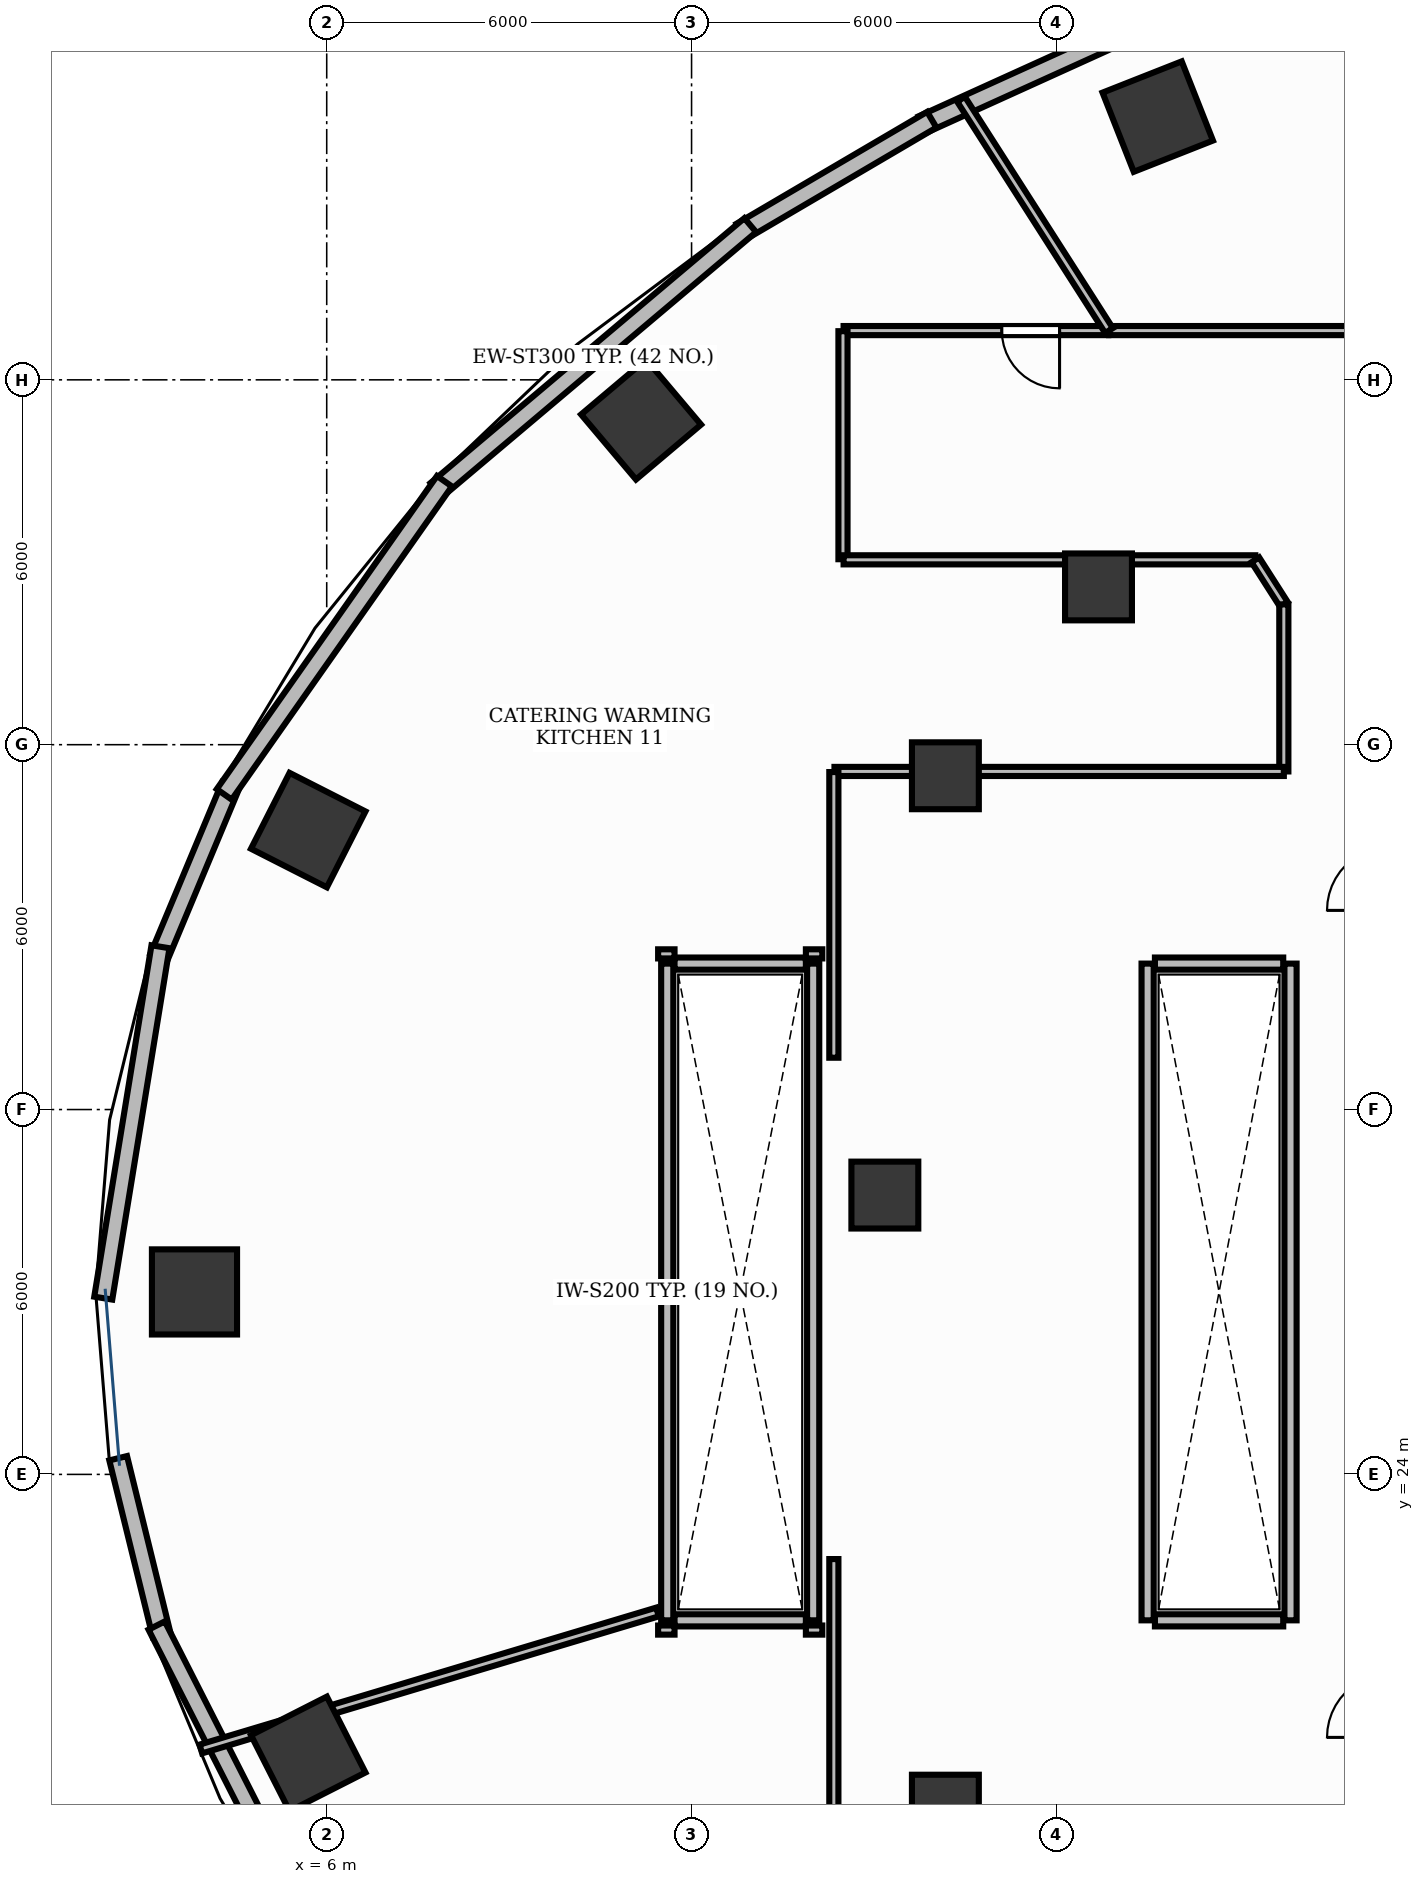
"""IFC4 building model, lengths in metres.
Left out: names, types, materials, properties, quantities, classifications, styles, units other than length and angle.
Written with IfcOpenShell. Run it as: python <this file> out.ifc"""

import sys

from ifc_helpers import new_model, si_unit, direction, frame, frame_2d, origin, origin_2d, place, context, subcontext, project, spatial, rectangle, extrude, element, fill, save


model = new_model("IFC4")
c1 = context("Model", 3, precision=1e-05, world=origin(), true_north=direction((0.0, 1.0)))
c2 = subcontext(c1, "Body", "Model", "MODEL_VIEW")
j1 = project(units=[si_unit("LENGTHUNIT", "METRE"), si_unit("PLANEANGLEUNIT", "RADIAN")], contexts=[c1])
p1 = place(None, origin())
s1 = spatial("IfcSite", under=j1, at=p1, CompositionType="ELEMENT")
p2 = place(p1, origin())
s2 = spatial("IfcBuilding", under=s1, at=p2, CompositionType="ELEMENT")
p3 = place(p2, frame((0.0, 0.0, 20.4)))
s3 = spatial("IfcBuildingStorey", under=s2, at=p3, CompositionType="ELEMENT", Elevation=20.4)
for number, where, z_axis, x_axis in (
    (1, (19.667, 46.329, -0.0), (0.0, 0.0, 1.0), (0.93, 0.367, 0.0)),
    (2, (11.17, 41.347, -0.0), (0.0, 0.0, 1.0), (0.764, 0.645, 0.0)),
):
    element("IfcColumn", number, at=place(p3, frame(where, z_axis=z_axis, x_axis=x_axis)), inside=s3, PredefinedType="COLUMN", context=c2, shape_type="SweptSolid", body=[
        extrude(rectangle(XDim=1.4, YDim=1.4, at=origin_2d()), origin(), (0.0, 0.0, 1.0), 5.101),
    ])
p4 = place(p3, frame((18.692, 38.595, -0.0), z_axis=(0.0, 0.0, 1.0), x_axis=(1.0, 0.0, 0.0)))
e3 = element("IfcColumn", 3, at=p4, inside=s3, PredefinedType="COLUMN", context=c2, shape_type="SweptSolid", body=[
    extrude(rectangle(XDim=1.1, YDim=1.1, at=origin_2d()), origin(), (0.0, 0.0, 1.0), 5.101),
])
p5 = place(p3, frame((5.696, 34.596, -0.0), z_axis=(0.0, 0.0, 1.0), x_axis=(0.453057191132, 0.891481453292, 0.0)))
e4 = element("IfcColumn", 4, at=p5, inside=s3, PredefinedType="COLUMN", context=c2, shape_type="SweptSolid", body=[
    extrude(rectangle(XDim=1.4, YDim=1.4, at=origin_2d()), origin(), (0.0, 0.0, 1.0), 5.101),
])
p6 = place(p3, frame((16.174, 35.489, -0.0), z_axis=(0.0, 0.0, 1.0), x_axis=(1.0, 0.0, 0.0)))
e5 = element("IfcColumn", 5, at=p6, inside=s3, PredefinedType="COLUMN", context=c2, shape_type="SweptSolid", body=[
    extrude(rectangle(XDim=1.1, YDim=1.1, at=origin_2d()), origin(), (0.0, 0.0, 1.0), 5.101),
])
p7 = place(p3, frame((3.825, 27.001, -0.0), z_axis=(0.0, 0.0, 1.0), x_axis=(0.0, 1.0, 0.0)))
e6 = element("IfcColumn", 6, at=p7, inside=s3, PredefinedType="COLUMN", context=c2, shape_type="SweptSolid", body=[
    extrude(rectangle(XDim=1.4, YDim=1.4, at=origin_2d()), origin(), (0.0, 0.0, 1.0), 5.101),
])
p8 = place(p3, frame((15.179, 28.594, -0.0), z_axis=(0.0, 0.0, 1.0), x_axis=(1.0, 0.0, 0.0)))
e7 = element("IfcColumn", 7, at=p8, inside=s3, PredefinedType="COLUMN", context=c2, shape_type="SweptSolid", body=[
    extrude(rectangle(XDim=1.1, YDim=1.1, at=origin_2d()), origin(), (0.0, 0.0, 1.0), 5.101),
])
p9 = place(p3, frame((5.696, 19.404, -0.0), z_axis=(0.0, 0.0, 1.0), x_axis=(-0.453057191132, 0.891481453292, 0.0)))
e8 = element("IfcColumn", 8, at=p9, inside=s3, PredefinedType="COLUMN", context=c2, shape_type="SweptSolid", body=[
    extrude(rectangle(XDim=1.4, YDim=1.4, at=origin_2d()), origin(), (0.0, 0.0, 1.0), 5.101),
])
p10 = place(p3, frame((16.174, 18.511, -0.0), z_axis=(0.0, 0.0, 1.0), x_axis=(1.0, 0.0, 0.0)))
e9 = element("IfcColumn", 9, at=p10, inside=s3, PredefinedType="COLUMN", context=c2, shape_type="SweptSolid", body=[
    extrude(rectangle(XDim=1.1, YDim=1.1, at=origin_2d()), origin(), (0.0, 0.0, 1.0), 5.101),
])
p11 = place(p3, frame((4.417, 35.323, 0.0), z_axis=(0.0, 0.0, 1.0), x_axis=(-0.385358473275, -0.92276695166, 0.0)))
e10 = element("IfcWall", 10, at=p11, inside=s3, PredefinedType="STANDARD", context=c2, shape_type="SweptSolid", body=[
    extrude(rectangle(XDim=3.056, YDim=0.3, at=frame_2d((1.528, 0.0))), origin(), (0.0, 0.0, 1.0), 4.67),
])
p12 = place(p3, frame((2.571, 24.266, 0.0), z_axis=(0.0, 0.0, 1.0), x_axis=(0.238522035896, -0.971137085273, 0.0)))
e11 = element("IfcWall", 11, at=p12, inside=s3, PredefinedType="STANDARD", context=c2, shape_type="SweptSolid", body=[
    extrude(rectangle(XDim=2.993, YDim=0.3, at=frame_2d((1.497, 0.0))), origin(), (0.0, 0.0, 1.0), 5.1),
])
p13 = place(p3, frame((19.201, 47.743, 0.0), z_axis=(0.0, 0.0, 1.0), x_axis=(-0.910623406862, -0.413237233166, 0.0)))
e12 = element("IfcWall", 12, at=p13, inside=s3, PredefinedType="STANDARD", context=c2, shape_type="SweptSolid", body=[
    extrude(rectangle(XDim=3.74, YDim=0.3, at=frame_2d((1.87, 0.0))), origin(), (0.0, 0.0, 1.0), 5.1),
])
p14 = place(p3, frame((15.951, 46.278, 0.0), z_axis=(0.0, 0.0, 1.0), x_axis=(-0.8624654944, -0.506115867139, 0.0)))
e13 = element("IfcWall", 13, at=p14, inside=s3, PredefinedType="STANDARD", context=c2, shape_type="SweptSolid", body=[
    extrude(rectangle(XDim=3.635, YDim=0.3, at=frame_2d((1.818, 0.0))), origin(), (0.0, 0.0, 1.0), 5.1),
])
p15 = place(p3, frame((12.965, 44.544, 0.0), z_axis=(0.0, 0.0, 1.0), x_axis=(-0.764279788114, -0.644884800162, 0.0)))
e14 = element("IfcWall", 14, at=p15, inside=s3, PredefinedType="STANDARD", context=c2, shape_type="SweptSolid", body=[
    extrude(rectangle(XDim=6.752, YDim=0.3, at=frame_2d((3.376, 0.0))), origin(), (0.0, 0.0, 1.0), 5.1),
])
p16 = place(p3, frame((7.936, 40.333, 0.0), z_axis=(0.0, 0.0, 1.0), x_axis=(-0.575165804445, -0.818036855769, 0.0)))
e15 = element("IfcWall", 15, at=p16, inside=s3, PredefinedType="STANDARD", context=c2, shape_type="SweptSolid", body=[
    extrude(rectangle(XDim=6.296, YDim=0.3, at=frame_2d((3.148, 0.0))), origin(), (0.0, 0.0, 1.0), 5.1),
])
p17 = place(p3, frame((3.266, 32.677, 0.0), z_axis=(0.0, 0.0, 1.0), x_axis=(-0.160712446639, -0.987001271273, 0.0)))
e16 = element("IfcWall", 16, at=p17, inside=s3, PredefinedType="STANDARD", context=c2, shape_type="SweptSolid", body=[
    extrude(rectangle(XDim=5.855, YDim=0.3, at=frame_2d((2.927, 0.0))), origin(), (0.0, 0.0, 1.0), 4.67),
])
p18 = place(p3, frame((3.204, 21.514, 0.0), z_axis=(0.0, 0.0, 1.0), x_axis=(0.453093111502, -0.891463197395, 0.0)))
e17 = element("IfcWall", 17, at=p18, inside=s3, PredefinedType="STANDARD", context=c2, shape_type="SweptSolid", body=[
    extrude(rectangle(XDim=6.102, YDim=0.3, at=frame_2d((3.051, 0.0))), origin(), (0.0, 0.0, 1.0), 5.1),
])
for number, where, z_axis, x_axis in (
    (18, (11.6, 21.6, 0.0), (0.0, 0.0, 1.0), (0.0, 1.0, 0.0)),
    (19, (14.0, 21.6, 0.0), (0.0, 0.0, 1.0), (0.0, 1.0, 0.0)),
):
    element("IfcWall", number, at=place(p3, frame(where, z_axis=z_axis, x_axis=x_axis)), inside=s3, PredefinedType="PARTITIONING", context=c2, shape_type="SweptSolid", body=[
        extrude(rectangle(XDim=10.8, YDim=0.2, at=frame_2d((5.4, 0.0))), origin(), (0.0, 0.0, 1.0), 4.11),
    ])
for number, where, z_axis, x_axis in (
    (20, (11.72, 21.6, 0.0), (0.0, 0.0, 1.0), (1.0, 0.0, 0.0)),
    (21, (11.72, 32.4, 0.0), (0.0, 0.0, 1.0), (1.0, 0.0, 0.0)),
):
    element("IfcWall", number, at=place(p3, frame(where, z_axis=z_axis, x_axis=x_axis)), inside=s3, PredefinedType="PARTITIONING", context=c2, shape_type="SweptSolid", body=[
        extrude(rectangle(XDim=2.16, YDim=0.2, at=frame_2d((1.08, 0.0))), origin(), (0.0, 0.0, 1.0), 4.11),
    ])
for number, where, z_axis, x_axis in (
    (22, (19.5, 21.6, 0.0), (0.0, 0.0, 1.0), (0.0, 1.0, 0.0)),
    (23, (21.85, 21.6, 0.0), (0.0, 0.0, 1.0), (0.0, 1.0, 0.0)),
):
    element("IfcWall", number, at=place(p3, frame(where, z_axis=z_axis, x_axis=x_axis)), inside=s3, PredefinedType="PARTITIONING", context=c2, shape_type="SweptSolid", body=[
        extrude(rectangle(XDim=10.8, YDim=0.2, at=frame_2d((5.4, 0.0))), origin(), (0.0, 0.0, 1.0), 4.11),
    ])
for number, where, z_axis, x_axis in (
    (24, (19.62, 21.6, 0.0), (0.0, 0.0, 1.0), (1.0, 0.0, 0.0)),
    (25, (19.62, 32.4, 0.0), (0.0, 0.0, 1.0), (1.0, 0.0, 0.0)),
):
    element("IfcWall", number, at=place(p3, frame(where, z_axis=z_axis, x_axis=x_axis)), inside=s3, PredefinedType="PARTITIONING", context=c2, shape_type="SweptSolid", body=[
        extrude(rectangle(XDim=2.11, YDim=0.2, at=frame_2d((1.055, 0.0))), origin(), (0.0, 0.0, 1.0), 4.11),
    ])
p19 = place(p3, frame((27.583, 42.81, 0.0), z_axis=(0.0, 0.0, 1.0), x_axis=(-1.0, 0.0, 0.0)))
e26 = element("IfcWall", 26, at=p19, inside=s3, PredefinedType="PARTITIONING", context=c2, shape_type="SweptSolid", body=[
    extrude(rectangle(XDim=8.718, YDim=0.15, at=frame_2d((4.359, 0.0))), origin(), (0.0, 0.0, 1.0), 4.11),
])
p20 = place(p19, frame((0.24, 0.0, 0.0)))
e27 = element("IfcOpeningElement", 27, at=p20, cuts=e26, PredefinedType="OPENING", context=c2, shape_type="SweptSolid", body=[
    extrude(rectangle(XDim=0.95, YDim=2.15, at=frame_2d((0.475, 1.075))), frame((0.0, 0.09, 0.0), z_axis=(0.0, -1.0, 0.0), x_axis=(1.0, 0.0, 0.0)), (0.0, 0.0, 1.0), 0.18),
])
p21 = place(p3, frame((18.853, 42.81, 0.0), z_axis=(0.0, 0.0, 1.0), x_axis=(-1.0, 0.0, 0.0)))
e28 = element("IfcWall", 28, at=p21, inside=s3, PredefinedType="PARTITIONING", context=c2, shape_type="SweptSolid", body=[
    extrude(rectangle(XDim=4.353, YDim=0.15, at=frame_2d((2.177, 0.0))), origin(), (0.0, 0.0, 1.0), 4.11),
])
p22 = place(p21, frame((0.801, 0.0, 0.0)))
e29 = element("IfcOpeningElement", 29, at=p22, cuts=e28, PredefinedType="OPENING", context=c2, shape_type="SweptSolid", body=[
    extrude(rectangle(XDim=0.95, YDim=2.15, at=frame_2d((0.475, 1.075))), frame((0.0, 0.09, 0.0), z_axis=(0.0, -1.0, 0.0), x_axis=(1.0, 0.0, 0.0)), (0.0, 0.0, 1.0), 0.18),
])
p23 = place(p3, frame((3.93, 19.484, 0.0), z_axis=(0.0, 0.0, 1.0), x_axis=(0.957822857275, 0.287359311806, 0.0)))
e30 = element("IfcWall", 30, at=p23, inside=s3, PredefinedType="PARTITIONING", context=c2, shape_type="SweptSolid", body=[
    extrude(rectangle(XDim=7.841, YDim=0.15, at=frame_2d((3.92, 0.0))), origin(), (0.0, 0.0, 1.0), 4.11),
])
for number, where, z_axis, x_axis in (
    (31, (11.45, 21.44, 0.0), (0.0, 0.0, 1.0), (1.0, 0.0, 0.0)),
    (32, (13.88, 21.44, 0.0), (0.0, 0.0, 1.0), (1.0, 0.0, 0.0)),
):
    element("IfcWall", number, at=place(p3, frame(where, z_axis=z_axis, x_axis=x_axis)), inside=s3, PredefinedType="PARTITIONING", context=c2, shape_type="SweptSolid", body=[
        extrude(rectangle(XDim=0.27, YDim=0.15, at=frame_2d((0.135, 0.0))), origin(), (0.0, 0.0, 1.0), 4.11),
    ])
p24 = place(p3, frame((14.34, 22.608, 0.0), z_axis=(0.0, 0.0, 1.0), x_axis=(0.0, -1.0, 0.0)))
e33 = element("IfcWall", 33, at=p24, inside=s3, PredefinedType="PARTITIONING", context=c2, shape_type="SweptSolid", body=[
    extrude(rectangle(XDim=4.158, YDim=0.15, at=frame_2d((2.079, 0.0))), origin(), (0.0, 0.0, 1.0), 4.11),
])
p25 = place(p3, frame((18.865, 42.81, 0.0), z_axis=(0.0, 0.0, 1.0), x_axis=(-0.538769890466, 0.842452969089, 0.0)))
e34 = element("IfcWall", 34, at=p25, inside=s3, PredefinedType="PARTITIONING", context=c2, shape_type="SweptSolid", body=[
    extrude(rectangle(XDim=4.517, YDim=0.15, at=frame_2d((2.258, 0.0))), origin(), (0.0, 0.0, 1.0), 4.11),
])
p26 = place(p3, frame((14.49, 42.8, 0.0), z_axis=(0.0, 0.0, 1.0), x_axis=(0.0, -1.0, 0.0)))
e35 = element("IfcWall", 35, at=p26, inside=s3, PredefinedType="PARTITIONING", context=c2, shape_type="SweptSolid", body=[
    extrude(rectangle(XDim=3.75, YDim=0.15, at=frame_2d((1.875, 0.0))), origin(), (0.0, 0.0, 1.0), 4.11),
])
p27 = place(p3, frame((14.5, 39.04, 0.0), z_axis=(0.0, 0.0, 1.0), x_axis=(1.0, 0.0, 0.0)))
e36 = element("IfcWall", 36, at=p27, inside=s3, PredefinedType="PARTITIONING", context=c2, shape_type="SweptSolid", body=[
    extrude(rectangle(XDim=6.771, YDim=0.15, at=frame_2d((3.386, 0.0))), origin(), (0.0, 0.0, 1.0), 4.11),
])
p28 = place(p3, frame((21.271, 39.04, 0.0), z_axis=(0.0, 0.0, 1.0), x_axis=(0.538798848234, -0.842434449166, 0.0)))
e37 = element("IfcWall", 37, at=p28, inside=s3, PredefinedType="PARTITIONING", context=c2, shape_type="SweptSolid", body=[
    extrude(rectangle(XDim=0.87, YDim=0.15, at=frame_2d((0.435, 0.0))), origin(), (0.0, 0.0, 1.0), 4.11),
])
p29 = place(p3, frame((21.74, 38.307, 0.0), z_axis=(0.0, 0.0, 1.0), x_axis=(0.0, -1.0, 0.0)))
e38 = element("IfcWall", 38, at=p29, inside=s3, PredefinedType="PARTITIONING", context=c2, shape_type="SweptSolid", body=[
    extrude(rectangle(XDim=2.747, YDim=0.15, at=frame_2d((1.374, 0.0))), origin(), (0.0, 0.0, 1.0), 4.11),
])
p30 = place(p3, frame((21.74, 35.56, 0.0), z_axis=(0.0, 0.0, 1.0), x_axis=(-1.0, 0.0, 0.0)))
e39 = element("IfcWall", 39, at=p30, inside=s3, PredefinedType="PARTITIONING", context=c2, shape_type="SweptSolid", body=[
    extrude(rectangle(XDim=7.39, YDim=0.15, at=frame_2d((3.695, 0.0))), origin(), (0.0, 0.0, 1.0), 4.11),
])
p31 = place(p3, frame((14.34, 35.55, 0.0), z_axis=(0.0, 0.0, 1.0), x_axis=(0.0, -1.0, 0.0)))
e40 = element("IfcWall", 40, at=p31, inside=s3, PredefinedType="PARTITIONING", context=c2, shape_type="SweptSolid", body=[
    extrude(rectangle(XDim=4.698, YDim=0.15, at=frame_2d((2.349, 0.0))), origin(), (0.0, 0.0, 1.0), 4.11),
])
for number, where, z_axis, x_axis in (
    (41, (14.15, 32.56, 0.0), (0.0, 0.0, 1.0), (-1.0, 0.0, 0.0)),
    (42, (11.72, 32.56, 0.0), (0.0, 0.0, 1.0), (-1.0, 0.0, 0.0)),
):
    element("IfcWall", number, at=place(p3, frame(where, z_axis=z_axis, x_axis=x_axis)), inside=s3, PredefinedType="PARTITIONING", context=c2, shape_type="SweptSolid", body=[
        extrude(rectangle(XDim=0.27, YDim=0.15, at=frame_2d((0.135, 0.0))), origin(), (0.0, 0.0, 1.0), 4.11),
    ])
p32 = place(p22, origin())
e43 = element("IfcDoor", 43, at=p32, inside=s3, OperationType="SINGLE_SWING_LEFT", PredefinedType="DOOR", context=c2, shape_type="SweptSolid", body=[
    extrude(rectangle(XDim=0.95, YDim=2.15, at=frame_2d((0.475, 1.075))), frame((0.0, 0.025, 0.0), z_axis=(0.0, -1.0, 0.0), x_axis=(1.0, 0.0, 0.0)), (0.0, 0.0, 1.0), 0.05),
])
fill(e29, e43)
save(model, sys.argv[1])
